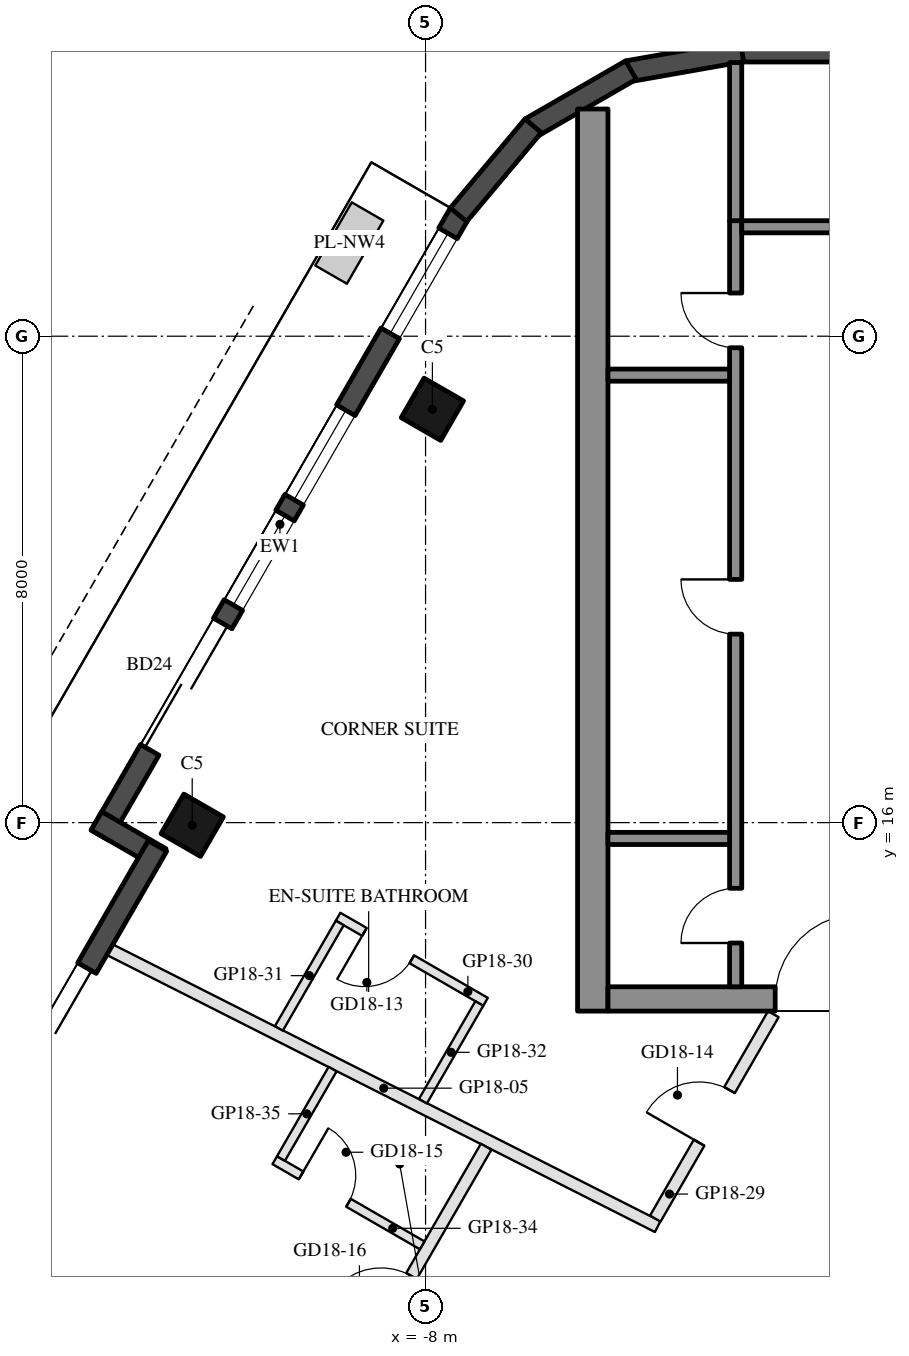
"""IFC4 building model, lengths in metres.
Left out: names, types, materials, properties, quantities, classifications, styles, units other than length and angle.
Written with IfcOpenShell. Run it as: python <this file> out.ifc"""

import sys

from ifc_helpers import new_model, si_unit, direction, frame, frame_2d, origin, origin_2d, place, context, subcontext, project, spatial, rectangle, hollow_rectangle, extrude, element, fill, save


model = new_model("IFC4")
c1 = context("Model", 3, precision=1e-05, world=origin(), true_north=direction((0.0, 1.0)))
c2 = subcontext(c1, "Body", "Model", "MODEL_VIEW")
j1 = project(units=[si_unit("LENGTHUNIT", "METRE"), si_unit("PLANEANGLEUNIT", "RADIAN")], contexts=[c1])
p1 = place(None, origin())
s1 = spatial("IfcSite", under=j1, at=p1, CompositionType="ELEMENT")
p2 = place(p1, origin())
s2 = spatial("IfcBuilding", under=s1, at=p2, CompositionType="ELEMENT")
p3 = place(p2, frame((0.0, 0.0, 191.0)))
s3 = spatial("IfcBuildingStorey", under=s2, at=p3, CompositionType="ELEMENT", Elevation=191.0)
for number, where, z_axis, x_axis in (
    (1, (-7.888, 22.798, 0.0), (0.0, 0.0, 1.0), (0.5, 0.866, 0.0)),
    (2, (-11.838, 15.957, 0.0), (0.0, 0.0, 1.0), (0.5, 0.866, 0.0)),
):
    element("IfcColumn", number, at=place(p3, frame(where, z_axis=z_axis, x_axis=x_axis)), inside=s3, PredefinedType="COLUMN", context=c2, shape_type="SweptSolid", body=[
        extrude(hollow_rectangle(XDim=0.75, YDim=0.75, WallThickness=0.035, at=origin_2d()), origin(), (0.0, 0.0, 1.0), 3.7),
    ])
p4 = place(p3, frame((-7.441, 26.022, 0.0), z_axis=(0.0, 0.0, 1.0), x_axis=(-0.499992533062, -0.86602971478, 0.0)))
e3 = element("IfcWall", 3, at=p4, inside=s3, PredefinedType="SOLIDWALL", context=c2, shape_type="SweptSolid", body=[
    extrude(rectangle(XDim=11.816, YDim=0.35, at=frame_2d((5.908, 0.0))), origin(), (0.0, 0.0, 1.0), 3.55),
])
p5 = place(p4, frame((0.381, 0.0, 0.3)))
e4 = element("IfcOpeningElement", 4, at=p5, cuts=e3, PredefinedType="OPENING", context=c2, shape_type="SweptSolid", body=[
    extrude(rectangle(XDim=1.9, YDim=2.65, at=frame_2d((0.95, 1.325))), frame((0.0, 0.185, 0.0), z_axis=(0.0, -1.0, 0.0), x_axis=(1.0, 0.0, 0.0)), (0.0, 0.0, 1.0), 0.37),
])
p6 = place(p4, frame((7.791, 0.0, 0.0)))
e5 = element("IfcOpeningElement", 5, at=p6, cuts=e3, PredefinedType="OPENING", context=c2, shape_type="SweptSolid", body=[
    extrude(rectangle(XDim=2.4, YDim=2.4, at=frame_2d((1.2, 1.2))), frame((0.0, 0.185, 0.0), z_axis=(0.0, -1.0, 0.0), x_axis=(1.0, 0.0, 0.0)), (0.0, 0.0, 1.0), 0.37),
])
p7 = place(p4, frame((3.741, 0.0, 0.3)))
e6 = element("IfcOpeningElement", 6, at=p7, cuts=e3, PredefinedType="OPENING", context=c2, shape_type="SweptSolid", body=[
    extrude(rectangle(XDim=1.7, YDim=2.65, at=frame_2d((0.85, 1.325))), frame((0.0, 0.185, 0.0), z_axis=(0.0, -1.0, 0.0), x_axis=(1.0, 0.0, 0.0)), (0.0, 0.0, 1.0), 0.37),
])
p8 = place(p4, frame((5.741, 0.0, 0.3)))
e7 = element("IfcOpeningElement", 7, at=p8, cuts=e3, PredefinedType="OPENING", context=c2, shape_type="SweptSolid", body=[
    extrude(rectangle(XDim=1.7, YDim=2.65, at=frame_2d((0.85, 1.325))), frame((0.0, 0.185, 0.0), z_axis=(0.0, -1.0, 0.0), x_axis=(1.0, 0.0, 0.0)), (0.0, 0.0, 1.0), 0.37),
])
p9 = place(p3, frame((-13.413, 16.029, 0.0), z_axis=(0.0, 0.0, 1.0), x_axis=(0.866005645448, -0.500034220881, 0.0)))
e8 = element("IfcWall", 8, at=p9, inside=s3, PredefinedType="SOLIDWALL", context=c2, shape_type="SweptSolid", body=[
    extrude(rectangle(XDim=1.22, YDim=0.35, at=frame_2d((0.61, 0.0))), origin(), (0.0, 0.0, 1.0), 3.55),
])
p10 = place(p3, frame((-12.409, 15.617, 0.0), z_axis=(0.0, 0.0, 1.0), x_axis=(-0.500003597184, -0.866023326939, 0.0)))
e9 = element("IfcWall", 9, at=p10, inside=s3, PredefinedType="SOLIDWALL", context=c2, shape_type="SweptSolid", body=[
    extrude(rectangle(XDim=6.74, YDim=0.35, at=frame_2d((3.37, 0.0))), origin(), (0.0, 0.0, 1.0), 3.55),
])
p11 = place(p10, frame((2.32, 0.0, 0.0)))
e10 = element("IfcOpeningElement", 10, at=p11, cuts=e9, PredefinedType="OPENING", context=c2, shape_type="SweptSolid", body=[
    extrude(rectangle(XDim=2.4, YDim=2.4, at=frame_2d((1.2, 1.2))), frame((0.0, 0.185, 0.0), z_axis=(0.0, -1.0, 0.0), x_axis=(1.0, 0.0, 0.0)), (0.0, 0.0, 1.0), 0.37),
])
p12 = place(p10, frame((5.02, 0.0, 0.3)))
e11 = element("IfcOpeningElement", 11, at=p12, cuts=e9, PredefinedType="OPENING", context=c2, shape_type="SweptSolid", body=[
    extrude(rectangle(XDim=0.9, YDim=2.65, at=frame_2d((0.45, 1.325))), frame((0.0, 0.185, 0.0), z_axis=(0.0, -1.0, 0.0), x_axis=(1.0, 0.0, 0.0)), (0.0, 0.0, 1.0), 0.37),
])
p13 = place(p3, frame((2.829, 28.685, 0.0), z_axis=(0.0, 0.0, 1.0), x_axis=(-1.0, 0.0, 0.0)))
e12 = element("IfcWall", 12, at=p13, inside=s3, PredefinedType="SOLIDWALL", context=c2, shape_type="SweptSolid", body=[
    extrude(rectangle(XDim=5.658, YDim=0.35, at=frame_2d((2.829, 0.0))), origin(), (0.0, 0.0, 1.0), 3.55),
])
for number, where, z_axis, x_axis in (
    (13, (-2.799, 28.688, 0.0), (0.0, 0.0, 1.0), (-0.985, -0.174, 0.0)),
    (14, (-4.623, 28.377, 0.0), (0.0, 0.0, 1.0), (-0.866, -0.5, 0.0)),
):
    element("IfcWall", number, at=place(p3, frame(where, z_axis=z_axis, x_axis=x_axis)), inside=s3, PredefinedType="SOLIDWALL", context=c2, shape_type="SweptSolid", body=[
        extrude(rectangle(XDim=1.91, YDim=0.35, at=frame_2d((0.955, 0.0))), origin(), (0.0, 0.0, 1.0), 3.55),
    ])
p14 = place(p3, frame((-6.23, 27.461, 0.0), z_axis=(0.0, 0.0, 1.0), x_axis=(-0.642808304945, -0.766027077259, 0.0)))
e15 = element("IfcWall", 15, at=p14, inside=s3, PredefinedType="SOLIDWALL", context=c2, shape_type="SweptSolid", body=[
    extrude(rectangle(XDim=1.91, YDim=0.35, at=frame_2d((0.955, 0.0))), origin(), (0.0, 0.0, 1.0), 3.55),
])
p15 = place(p3, frame((-5.25, 12.9, 0.0), z_axis=(0.0, 0.0, 1.0), x_axis=(0.0, 1.0, 0.0)))
e16 = element("IfcWall", 16, at=p15, inside=s3, PredefinedType="SHEAR", context=c2, shape_type="SweptSolid", body=[
    extrude(rectangle(XDim=14.837, YDim=0.5, at=frame_2d((7.418, 0.0))), origin(), (0.0, 0.0, 1.0), 3.5),
])
p16 = place(p3, frame((5.0, 13.1, 0.0), z_axis=(0.0, 0.0, 1.0), x_axis=(-1.0, 0.0, 0.0)))
e17 = element("IfcWall", 17, at=p16, inside=s3, PredefinedType="SHEAR", context=c2, shape_type="SweptSolid", body=[
    extrude(rectangle(XDim=10.0, YDim=0.4, at=frame_2d((5.0, 0.0))), origin(), (0.0, 0.0, 1.0), 3.5),
])
p17 = place(p16, frame((3.55, 0.0, 0.0)))
e18 = element("IfcOpeningElement", 18, at=p17, cuts=e17, PredefinedType="OPENING", context=c2, shape_type="SweptSolid", body=[
    extrude(rectangle(XDim=1.1, YDim=2.1, at=frame_2d((0.55, 1.05))), frame((0.0, 0.21, 0.0), z_axis=(0.0, -1.0, 0.0), x_axis=(1.0, 0.0, 0.0)), (0.0, 0.0, 1.0), 0.42),
])
p18 = place(p16, frame((5.85, 0.0, 0.0)))
e19 = element("IfcOpeningElement", 19, at=p18, cuts=e17, PredefinedType="OPENING", context=c2, shape_type="SweptSolid", body=[
    extrude(rectangle(XDim=1.4, YDim=2.1, at=frame_2d((0.7, 1.05))), frame((0.0, 0.21, 0.0), z_axis=(0.0, -1.0, 0.0), x_axis=(1.0, 0.0, 0.0)), (0.0, 0.0, 1.0), 0.42),
])
p19 = place(p3, frame((-2.9, 13.3, 0.0), z_axis=(0.0, 0.0, 1.0), x_axis=(0.0, 1.0, 0.0)))
e20 = element("IfcWall", 20, at=p19, inside=s3, PredefinedType="SHEAR", context=c2, shape_type="SweptSolid", body=[
    extrude(rectangle(XDim=12.6, YDim=0.2, at=frame_2d((6.3, 0.0))), origin(), (0.0, 0.0, 1.0), 3.5),
])
p20 = place(p19, frame((0.72, 0.0, 0.0)))
e21 = element("IfcOpeningElement", 21, at=p20, cuts=e20, PredefinedType="OPENING", context=c2, shape_type="SweptSolid", body=[
    extrude(rectangle(XDim=0.9, YDim=2.1, at=frame_2d((0.45, 1.05))), frame((0.0, 0.11, 0.0), z_axis=(0.0, -1.0, 0.0), x_axis=(1.0, 0.0, 0.0)), (0.0, 0.0, 1.0), 0.22),
])
p21 = place(p19, frame((5.8, 0.0, 0.0)))
e22 = element("IfcOpeningElement", 22, at=p21, cuts=e20, PredefinedType="OPENING", context=c2, shape_type="SweptSolid", body=[
    extrude(rectangle(XDim=0.9, YDim=2.1, at=frame_2d((0.45, 1.05))), frame((0.0, 0.11, 0.0), z_axis=(0.0, -1.0, 0.0), x_axis=(1.0, 0.0, 0.0)), (0.0, 0.0, 1.0), 0.22),
])
p22 = place(p19, frame((10.51, 0.0, 0.0)))
e23 = element("IfcOpeningElement", 23, at=p22, cuts=e20, PredefinedType="OPENING", context=c2, shape_type="SweptSolid", body=[
    extrude(rectangle(XDim=0.9, YDim=2.1, at=frame_2d((0.45, 1.05))), frame((0.0, 0.11, 0.0), z_axis=(0.0, -1.0, 0.0), x_axis=(1.0, 0.0, 0.0)), (0.0, 0.0, 1.0), 0.22),
])
p23 = place(p3, frame((-0.4, 25.8, 0.0), z_axis=(0.0, 0.0, 1.0), x_axis=(-1.0, 0.0, 0.0)))
e24 = element("IfcWall", 24, at=p23, inside=s3, PredefinedType="SHEAR", context=c2, shape_type="SweptSolid", body=[
    extrude(rectangle(XDim=2.4, YDim=0.2, at=frame_2d((1.2, 0.0))), origin(), (0.0, 0.0, 1.0), 3.5),
])
for number, where, z_axis, x_axis in (
    (25, (-3.0, 15.74, 0.0), (0.0, 0.0, 1.0), (-1.0, 0.0, 0.0)),
    (26, (-3.0, 23.36, 0.0), (0.0, 0.0, 1.0), (-1.0, 0.0, 0.0)),
):
    element("IfcWall", number, at=place(p3, frame(where, z_axis=z_axis, x_axis=x_axis)), inside=s3, PredefinedType="SHEAR", context=c2, shape_type="SweptSolid", body=[
        extrude(rectangle(XDim=2.0, YDim=0.2, at=frame_2d((1.0, 0.0))), origin(), (0.0, 0.0, 1.0), 3.5),
    ])
p24 = place(p3, frame((-2.9, 25.9, 0.0), z_axis=(0.0, 0.0, 1.0), x_axis=(0.0, 1.0, 0.0)))
e27 = element("IfcWall", 27, at=p24, inside=s3, PredefinedType="SHEAR", context=c2, shape_type="SweptSolid", body=[
    extrude(rectangle(XDim=2.6, YDim=0.2, at=frame_2d((1.3, 0.0))), origin(), (0.0, 0.0, 1.0), 3.5),
])
p25 = place(p3, frame((-13.192, 13.91, 0.0), z_axis=(0.0, 0.0, 1.0), x_axis=(0.892469554868, -0.451107629766, 0.0)))
e28 = element("IfcWall", 28, at=p25, inside=s3, PredefinedType="PARTITIONING", context=c2, shape_type="SweptSolid", body=[
    extrude(rectangle(XDim=10.096, YDim=0.2, at=frame_2d((5.048, 0.0))), origin(), (0.0, 0.0, 1.0), 3.06),
])
p26 = place(p3, frame((-4.222, 9.488, 0.0), z_axis=(0.0, 0.0, 1.0), x_axis=(0.49998736472, 0.866032698644, 0.0)))
e29 = element("IfcWall", 29, at=p26, inside=s3, PredefinedType="PARTITIONING", context=c2, shape_type="SweptSolid", body=[
    extrude(rectangle(XDim=3.882, YDim=0.2, at=frame_2d((1.941, 0.0))), origin(), (0.0, 0.0, 1.0), 2.95),
])
p27 = place(p26, frame((1.441, 0.0, 0.0)))
e30 = element("IfcOpeningElement", 30, at=p27, cuts=e29, PredefinedType="OPENING", context=c2, shape_type="SweptSolid", body=[
    extrude(rectangle(XDim=1.0, YDim=2.1, at=frame_2d((0.5, 1.05))), frame((0.0, 0.11, 0.0), z_axis=(0.0, -1.0, 0.0), x_axis=(1.0, 0.0, 0.0)), (0.0, 0.0, 1.0), 0.22),
])
p28 = place(p3, frame((-7.013, 13.052, 0.0), z_axis=(0.0, 0.0, 1.0), x_axis=(-0.866034573852, 0.49998411664, 0.0)))
e31 = element("IfcWall", 31, at=p28, inside=s3, PredefinedType="PARTITIONING", context=c2, shape_type="SweptSolid", body=[
    extrude(rectangle(XDim=2.8, YDim=0.15, at=frame_2d((1.4, 0.0))), origin(), (0.0, 0.0, 1.0), 2.95),
])
p29 = place(p28, frame((1.4, 0.0, 0.0)))
e32 = element("IfcOpeningElement", 32, at=p29, cuts=e31, PredefinedType="OPENING", context=c2, shape_type="SweptSolid", body=[
    extrude(rectangle(XDim=0.9, YDim=2.1, at=frame_2d((0.45, 1.05))), frame((0.0, 0.085, 0.0), z_axis=(0.0, -1.0, 0.0), x_axis=(1.0, 0.0, 0.0)), (0.0, 0.0, 1.0), 0.17),
])
p30 = place(p3, frame((-9.411, 14.35, 0.0), z_axis=(0.0, 0.0, 1.0), x_axis=(-0.499982900776, -0.866035275801, 0.0)))
e33 = element("IfcWall", 33, at=p30, inside=s3, PredefinedType="PARTITIONING", context=c2, shape_type="SweptSolid", body=[
    extrude(rectangle(XDim=2.001, YDim=0.15, at=frame_2d((1.001, 0.0))), origin(), (0.0, 0.0, 1.0), 3.55),
])
p31 = place(p3, frame((-7.116, 13.025, 0.0), z_axis=(0.0, 0.0, 1.0), x_axis=(-0.4999770169, -0.866038672677, 0.0)))
e34 = element("IfcWall", 34, at=p31, inside=s3, PredefinedType="PARTITIONING", context=c2, shape_type="SweptSolid", body=[
    extrude(rectangle(XDim=1.854, YDim=0.15, at=frame_2d((0.927, 0.0))), origin(), (0.0, 0.0, 1.0), 3.55),
])
p32 = place(p3, frame((-11.962, 2.081, 0.0), z_axis=(0.0, 0.0, 1.0), x_axis=(0.500007290723, 0.866021194443, 0.0)))
e35 = element("IfcWall", 35, at=p32, inside=s3, PredefinedType="PARTITIONING", context=c2, shape_type="SweptSolid", body=[
    extrude(rectangle(XDim=9.917, YDim=0.2, at=frame_2d((4.958, 0.0))), origin(), (0.0, 0.0, 1.0), 2.95),
])
p33 = place(p32, frame((6.462, 0.0, 0.0)))
e36 = element("IfcOpeningElement", 36, at=p33, cuts=e35, PredefinedType="OPENING", context=c2, shape_type="SweptSolid", body=[
    extrude(rectangle(XDim=1.0, YDim=2.1, at=frame_2d((0.5, 1.05))), frame((0.0, 0.11, 0.0), z_axis=(0.0, -1.0, 0.0), x_axis=(1.0, 0.0, 0.0)), (0.0, 0.0, 1.0), 0.22),
])
p34 = place(p3, frame((-10.48, 10.448, 0.0), z_axis=(0.0, 0.0, 1.0), x_axis=(0.865996816683, -0.500049511043, 0.0)))
e37 = element("IfcWall", 37, at=p34, inside=s3, PredefinedType="PARTITIONING", context=c2, shape_type="SweptSolid", body=[
    extrude(rectangle(XDim=2.8, YDim=0.15, at=frame_2d((1.4, 0.0))), origin(), (0.0, 0.0, 1.0), 2.95),
])
p35 = place(p34, frame((0.5, 0.0, 0.0)))
e38 = element("IfcOpeningElement", 38, at=p35, cuts=e37, PredefinedType="OPENING", context=c2, shape_type="SweptSolid", body=[
    extrude(rectangle(XDim=0.9, YDim=2.1, at=frame_2d((0.45, 1.05))), frame((0.0, 0.085, 0.0), z_axis=(0.0, -1.0, 0.0), x_axis=(1.0, 0.0, 0.0)), (0.0, 0.0, 1.0), 0.17),
])
p36 = place(p3, frame((-9.529, 11.946, 0.0), z_axis=(0.0, 0.0, 1.0), x_axis=(-0.499942281444, -0.866058725044, 0.0)))
e39 = element("IfcWall", 39, at=p36, inside=s3, PredefinedType="PARTITIONING", context=c2, shape_type="SweptSolid", body=[
    extrude(rectangle(XDim=1.698, YDim=0.15, at=frame_2d((0.849, 0.0))), origin(), (0.0, 0.0, 1.0), 2.95),
])
p37 = place(p5, origin())
e40 = element("IfcWindow", 40, at=p37, inside=s3, PartitioningType="SINGLE_PANEL", PredefinedType="WINDOW", context=c2, shape_type="SweptSolid", body=[
    extrude(rectangle(XDim=1.9, YDim=2.65, at=frame_2d((0.95, 1.325))), frame((0.0, 0.03, 0.0), z_axis=(0.0, -1.0, 0.0), x_axis=(1.0, 0.0, 0.0)), (0.0, 0.0, 1.0), 0.06),
])
fill(e4, e40)
p38 = place(p6, frame((2.4, 0.0, 0.0), z_axis=(0.0, 0.0, 1.0), x_axis=(-1.0, 0.0, 0.0)))
e41 = element("IfcDoor", 41, at=p38, inside=s3, OperationType="SLIDING_TO_LEFT", PredefinedType="DOOR", context=c2, shape_type="SweptSolid", body=[
    extrude(rectangle(XDim=2.4, YDim=2.4, at=frame_2d((1.2, 1.2))), frame((0.0, 0.025, 0.0), z_axis=(0.0, -1.0, 0.0), x_axis=(1.0, 0.0, 0.0)), (0.0, 0.0, 1.0), 0.05),
])
fill(e5, e41)
p39 = place(p7, origin())
e42 = element("IfcWindow", 42, at=p39, inside=s3, PartitioningType="SINGLE_PANEL", PredefinedType="WINDOW", context=c2, shape_type="SweptSolid", body=[
    extrude(rectangle(XDim=1.7, YDim=2.65, at=frame_2d((0.85, 1.325))), frame((0.0, 0.03, 0.0), z_axis=(0.0, -1.0, 0.0), x_axis=(1.0, 0.0, 0.0)), (0.0, 0.0, 1.0), 0.06),
])
fill(e6, e42)
p40 = place(p8, origin())
e43 = element("IfcWindow", 43, at=p40, inside=s3, PartitioningType="SINGLE_PANEL", PredefinedType="WINDOW", context=c2, shape_type="SweptSolid", body=[
    extrude(rectangle(XDim=1.7, YDim=2.65, at=frame_2d((0.85, 1.325))), frame((0.0, 0.03, 0.0), z_axis=(0.0, -1.0, 0.0), x_axis=(1.0, 0.0, 0.0)), (0.0, 0.0, 1.0), 0.06),
])
fill(e7, e43)
p41 = place(p11, frame((2.4, 0.0, 0.0), z_axis=(0.0, 0.0, 1.0), x_axis=(-1.0, 0.0, 0.0)))
e44 = element("IfcDoor", 44, at=p41, inside=s3, OperationType="SLIDING_TO_LEFT", PredefinedType="DOOR", context=c2, shape_type="SweptSolid", body=[
    extrude(rectangle(XDim=2.4, YDim=2.4, at=frame_2d((1.2, 1.2))), frame((0.0, 0.025, 0.0), z_axis=(0.0, -1.0, 0.0), x_axis=(1.0, 0.0, 0.0)), (0.0, 0.0, 1.0), 0.05),
])
fill(e10, e44)
p42 = place(p20, origin())
e45 = element("IfcDoor", 45, at=p42, inside=s3, OperationType="SINGLE_SWING_LEFT", PredefinedType="DOOR", context=c2, shape_type="SweptSolid", body=[
    extrude(rectangle(XDim=0.9, YDim=2.1, at=frame_2d((0.45, 1.05))), frame((0.0, 0.025, 0.0), z_axis=(0.0, -1.0, 0.0), x_axis=(1.0, 0.0, 0.0)), (0.0, 0.0, 1.0), 0.05),
])
fill(e21, e45)
p43 = place(p21, origin())
e46 = element("IfcDoor", 46, at=p43, inside=s3, OperationType="SINGLE_SWING_RIGHT", PredefinedType="DOOR", context=c2, shape_type="SweptSolid", body=[
    extrude(rectangle(XDim=0.9, YDim=2.1, at=frame_2d((0.45, 1.05))), frame((0.0, 0.025, 0.0), z_axis=(0.0, -1.0, 0.0), x_axis=(1.0, 0.0, 0.0)), (0.0, 0.0, 1.0), 0.05),
])
fill(e22, e46)
p44 = place(p22, origin())
e47 = element("IfcDoor", 47, at=p44, inside=s3, OperationType="SINGLE_SWING_RIGHT", PredefinedType="DOOR", context=c2, shape_type="SweptSolid", body=[
    extrude(rectangle(XDim=0.9, YDim=2.1, at=frame_2d((0.45, 1.05))), frame((0.0, 0.025, 0.0), z_axis=(0.0, -1.0, 0.0), x_axis=(1.0, 0.0, 0.0)), (0.0, 0.0, 1.0), 0.05),
])
fill(e23, e47)
p45 = place(p18, frame((1.4, 0.0, 0.0), z_axis=(0.0, 0.0, 1.0), x_axis=(-1.0, 0.0, 0.0)))
e48 = element("IfcDoor", 48, at=p45, inside=s3, OperationType="DOUBLE_DOOR_SINGLE_SWING", PredefinedType="DOOR", context=c2, shape_type="SweptSolid", body=[
    extrude(rectangle(XDim=1.4, YDim=2.1, at=frame_2d((0.7, 1.05))), frame((0.0, 0.025, 0.0), z_axis=(0.0, -1.0, 0.0), x_axis=(1.0, 0.0, 0.0)), (0.0, 0.0, 1.0), 0.05),
])
fill(e19, e48)
p46 = place(p29, origin())
e49 = element("IfcDoor", 49, at=p46, inside=s3, OperationType="SINGLE_SWING_RIGHT", PredefinedType="DOOR", context=c2, shape_type="SweptSolid", body=[
    extrude(rectangle(XDim=0.9, YDim=2.1, at=frame_2d((0.45, 1.05))), frame((0.0, 0.025, 0.0), z_axis=(0.0, -1.0, 0.0), x_axis=(1.0, 0.0, 0.0)), (0.0, 0.0, 1.0), 0.05),
])
fill(e32, e49)
p47 = place(p27, origin())
e50 = element("IfcDoor", 50, at=p47, inside=s3, OperationType="SINGLE_SWING_LEFT", PredefinedType="DOOR", context=c2, shape_type="SweptSolid", body=[
    extrude(rectangle(XDim=1.0, YDim=2.1, at=frame_2d((0.5, 1.05))), frame((0.0, 0.025, 0.0), z_axis=(0.0, -1.0, 0.0), x_axis=(1.0, 0.0, 0.0)), (0.0, 0.0, 1.0), 0.05),
])
fill(e30, e50)
p48 = place(p35, origin())
e51 = element("IfcDoor", 51, at=p48, inside=s3, OperationType="SINGLE_SWING_LEFT", PredefinedType="DOOR", context=c2, shape_type="SweptSolid", body=[
    extrude(rectangle(XDim=0.9, YDim=2.1, at=frame_2d((0.45, 1.05))), frame((0.0, 0.025, 0.0), z_axis=(0.0, -1.0, 0.0), x_axis=(1.0, 0.0, 0.0)), (0.0, 0.0, 1.0), 0.05),
])
fill(e38, e51)
p49 = place(p33, origin())
e52 = element("IfcDoor", 52, at=p49, inside=s3, OperationType="SINGLE_SWING_LEFT", PredefinedType="DOOR", context=c2, shape_type="SweptSolid", body=[
    extrude(rectangle(XDim=1.0, YDim=2.1, at=frame_2d((0.5, 1.05))), frame((0.0, 0.025, 0.0), z_axis=(0.0, -1.0, 0.0), x_axis=(1.0, 0.0, 0.0)), (0.0, 0.0, 1.0), 0.05),
])
fill(e36, e52)
save(model, sys.argv[1])
